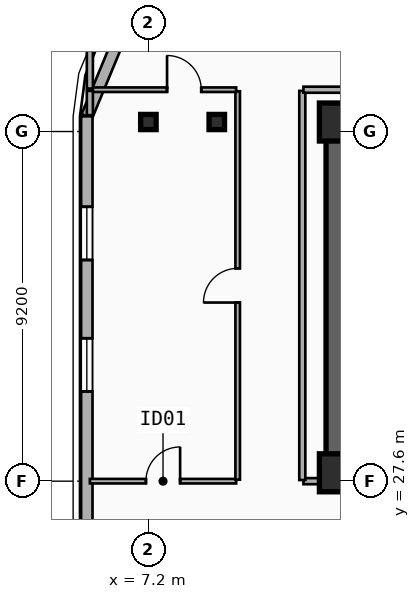
"""IFC4 building model, lengths in metres.
Left out: names, types, materials, properties, quantities, classifications, styles, units other than length and angle.
Written with IfcOpenShell. Run it as: python <this file> out.ifc"""

import sys

from ifc_helpers import new_model, si_unit, direction, frame, frame_2d, origin, origin_2d, place, context, subcontext, project, spatial, rectangle, i_section, extrude, element, fill, save


model = new_model("IFC4")
c1 = context("Model", 3, precision=1e-05, world=origin(), true_north=direction((0.0, 1.0)))
c2 = subcontext(c1, "Body", "Model", "MODEL_VIEW")
j1 = project(units=[si_unit("LENGTHUNIT", "METRE"), si_unit("PLANEANGLEUNIT", "RADIAN")], contexts=[c1])
p1 = place(None, origin())
s1 = spatial("IfcSite", under=j1, at=p1, CompositionType="ELEMENT")
p2 = place(p1, origin())
s2 = spatial("IfcBuilding", under=s1, at=p2, CompositionType="ELEMENT")
p3 = place(p2, frame((0.0, 0.0, 196.8)))
s3 = spatial("IfcBuildingStorey", under=s2, at=p3, CompositionType="ELEMENT", Elevation=196.8)
p4 = place(p3, frame((12.15, 37.05, 0.0), z_axis=(0.0, 0.0, 1.0), x_axis=(1.0, 0.0, 0.0)))
e1 = element("IfcWall", 1, at=p4, inside=s3, PredefinedType="SHEAR", context=c2, shape_type="SweptSolid", body=[
    extrude(rectangle(XDim=33.23, YDim=0.55, at=frame_2d((16.615, 0.0))), origin(), (0.0, 0.0, 1.0), 3.6),
])
p5 = place(p3, frame((21.18, 27.82, 0.0), z_axis=(0.0, 0.0, 1.0), x_axis=(-1.0, 0.0, 0.0)))
e2 = element("IfcWall", 2, at=p5, inside=s3, PredefinedType="SHEAR", context=c2, shape_type="SweptSolid", body=[
    extrude(rectangle(XDim=9.03, YDim=0.55, at=frame_2d((4.515, 0.0))), origin(), (0.0, 0.0, 1.0), 3.6),
])
p6 = place(p5, frame((2.68, 0.0, 0.0)))
e3 = element("IfcOpeningElement", 3, at=p6, cuts=e2, PredefinedType="OPENING", context=c2, shape_type="SweptSolid", body=[
    extrude(rectangle(XDim=1.1, YDim=2.15, at=frame_2d((0.55, 1.075))), frame((0.0, 0.285, 0.0), z_axis=(0.0, -1.0, 0.0), x_axis=(1.0, 0.0, 0.0)), (0.0, 0.0, 1.0), 0.57),
])
p7 = place(p3, frame((12.15, 28.095, 0.0), z_axis=(0.0, 0.0, 1.0), x_axis=(0.0, 1.0, 0.0)))
e4 = element("IfcWall", 4, at=p7, inside=s3, PredefinedType="SHEAR", context=c2, shape_type="SweptSolid", body=[
    extrude(rectangle(XDim=8.68, YDim=0.55, at=frame_2d((4.34, 0.0))), origin(), (0.0, 0.0, 1.0), 3.6),
])
for number, where, z_axis, x_axis in (
    (5, (12.2, 27.82, 0.0), (0.0, 0.0, 1.0), (1.0, 0.0, 0.0)),
    (6, (12.2, 37.05, 0.0), (0.0, 0.0, 1.0), (1.0, 0.0, 0.0)),
):
    element("IfcColumn", number, at=place(p3, frame(where, z_axis=z_axis, x_axis=x_axis)), inside=s3, PredefinedType="COLUMN", context=c2, shape_type="SweptSolid", body=[
        extrude(rectangle(XDim=1.0, YDim=1.0, at=origin_2d()), origin(), (0.0, 0.0, 1.0), 3.6),
    ])
for number, where, z_axis, x_axis in (
    (7, (9.0, 37.05, 0.0), (0.0, 0.0, 1.0), (1.0, 0.0, 0.0)),
    (8, (7.2, 37.05, 0.0), (0.0, 0.0, 1.0), (1.0, 0.0, 0.0)),
):
    element("IfcColumn", number, at=place(p3, frame(where, z_axis=z_axis, x_axis=x_axis)), inside=s3, PredefinedType="COLUMN", context=c2, shape_type="SweptSolid", body=[
        extrude(i_section(OverallWidth=0.408, OverallDepth=0.4, WebThickness=0.025, FlangeThickness=0.039, FilletRadius=0.015, at=origin_2d()), origin(), (0.0, 0.0, 1.0), 3.6),
    ])
p8 = place(p3, frame((5.58, 37.2, 0.0), z_axis=(0.0, 0.0, 1.0), x_axis=(0.382636798336, 0.92389884758, 0.0)))
e9 = element("IfcWall", 9, at=p8, inside=s3, PredefinedType="SOLIDWALL", context=c2, shape_type="SweptSolid", body=[
    extrude(rectangle(XDim=3.077, YDim=0.3, at=frame_2d((1.538, 0.0))), origin(), (0.0, 0.0, 1.0), 3.34),
])
p9 = place(p3, frame((5.58, 8.6, 0.0), z_axis=(0.0, 0.0, 1.0), x_axis=(0.0, 1.0, 0.0)))
e10 = element("IfcWall", 10, at=p9, inside=s3, PredefinedType="SOLIDWALL", context=c2, shape_type="SweptSolid", body=[
    extrude(rectangle(XDim=28.6, YDim=0.3, at=frame_2d((14.3, 0.0))), origin(), (0.0, 0.0, 1.0), 3.34),
])
p10 = place(p9, frame((21.36, 0.0, 0.34)))
e11 = element("IfcOpeningElement", 11, at=p10, cuts=e10, PredefinedType="OPENING", context=c2, shape_type="SweptSolid", body=[
    extrude(rectangle(XDim=1.4, YDim=2.1, at=frame_2d((0.7, 1.05))), frame((0.0, 0.16, 0.0), z_axis=(0.0, -1.0, 0.0), x_axis=(1.0, 0.0, 0.0)), (0.0, 0.0, 1.0), 0.32),
])
p11 = place(p9, frame((24.82, 0.0, 0.34)))
e12 = element("IfcOpeningElement", 12, at=p11, cuts=e10, PredefinedType="OPENING", context=c2, shape_type="SweptSolid", body=[
    extrude(rectangle(XDim=1.4, YDim=2.1, at=frame_2d((0.7, 1.05))), frame((0.0, 0.16, 0.0), z_axis=(0.0, -1.0, 0.0), x_axis=(1.0, 0.0, 0.0)), (0.0, 0.0, 1.0), 0.32),
])
p12 = place(p9, frame((4.797, 0.0, 0.34)))
e13 = element("IfcOpeningElement", 13, at=p12, cuts=e10, PredefinedType="OPENING", context=c2, shape_type="SweptSolid", body=[
    extrude(rectangle(XDim=1.4, YDim=2.1, at=frame_2d((0.7, 1.05))), frame((0.0, 0.16, 0.0), z_axis=(0.0, -1.0, 0.0), x_axis=(1.0, 0.0, 0.0)), (0.0, 0.0, 1.0), 0.32),
])
p13 = place(p9, frame((10.673, 0.0, 0.34)))
e14 = element("IfcOpeningElement", 14, at=p13, cuts=e10, PredefinedType="OPENING", context=c2, shape_type="SweptSolid", body=[
    extrude(rectangle(XDim=1.4, YDim=2.1, at=frame_2d((0.7, 1.05))), frame((0.0, 0.16, 0.0), z_axis=(0.0, -1.0, 0.0), x_axis=(1.0, 0.0, 0.0)), (0.0, 0.0, 1.0), 0.32),
])
p14 = place(p3, frame((5.66, 27.6, 0.0), z_axis=(0.0, 0.0, 1.0), x_axis=(1.0, 0.0, 0.0)))
e15 = element("IfcWall", 15, at=p14, inside=s3, PredefinedType="PARTITIONING", context=c2, shape_type="SweptSolid", body=[
    extrude(rectangle(XDim=3.85, YDim=0.12, at=frame_2d((1.925, 0.0))), origin(), (0.0, 0.0, 1.0), 2.67),
])
p15 = place(p14, frame((1.475, 0.0, 0.0)))
e16 = element("IfcOpeningElement", 16, at=p15, cuts=e15, PredefinedType="OPENING", context=c2, shape_type="SweptSolid", body=[
    extrude(rectangle(XDim=0.9, YDim=2.1, at=frame_2d((0.45, 1.05))), frame((0.0, 0.07, 0.0), z_axis=(0.0, -1.0, 0.0), x_axis=(1.0, 0.0, 0.0)), (0.0, 0.0, 1.0), 0.14),
])
p16 = place(p3, frame((9.55, 27.64, 0.0), z_axis=(0.0, 0.0, 1.0), x_axis=(0.0, 1.0, 0.0)))
e17 = element("IfcWall", 17, at=p16, inside=s3, PredefinedType="PARTITIONING", context=c2, shape_type="SweptSolid", body=[
    extrude(rectangle(XDim=10.22, YDim=0.12, at=frame_2d((5.11, 0.0))), origin(), (0.0, 0.0, 1.0), 2.82),
])
p17 = place(p16, frame((4.66, 0.0, 0.0)))
e18 = element("IfcOpeningElement", 18, at=p17, cuts=e17, PredefinedType="OPENING", context=c2, shape_type="SweptSolid", body=[
    extrude(rectangle(XDim=0.9, YDim=2.1, at=frame_2d((0.45, 1.05))), frame((0.0, 0.07, 0.0), z_axis=(0.0, -1.0, 0.0), x_axis=(1.0, 0.0, 0.0)), (0.0, 0.0, 1.0), 0.14),
])
p18 = place(p3, frame((5.66, 37.9, 0.0), z_axis=(0.0, 0.0, 1.0), x_axis=(1.0, 0.0, 0.0)))
e19 = element("IfcWall", 19, at=p18, inside=s3, PredefinedType="PARTITIONING", context=c2, shape_type="SweptSolid", body=[
    extrude(rectangle(XDim=3.85, YDim=0.12, at=frame_2d((1.925, 0.0))), origin(), (0.0, 0.0, 1.0), 3.34),
])
p19 = place(p18, frame((2.031, 0.0, 0.0)))
e20 = element("IfcOpeningElement", 20, at=p19, cuts=e19, PredefinedType="OPENING", context=c2, shape_type="SweptSolid", body=[
    extrude(rectangle(XDim=0.9, YDim=2.1, at=frame_2d((0.45, 1.05))), frame((0.0, 0.07, 0.0), z_axis=(0.0, -1.0, 0.0), x_axis=(1.0, 0.0, 0.0)), (0.0, 0.0, 1.0), 0.14),
])
p20 = place(p3, frame((11.28, 27.6, 0.0), z_axis=(0.0, 0.0, 1.0), x_axis=(1.0, 0.0, 0.0)))
e21 = element("IfcWall", 21, at=p20, inside=s3, PredefinedType="PARTITIONING", context=c2, shape_type="SweptSolid", body=[
    extrude(rectangle(XDim=0.84, YDim=0.16, at=frame_2d((0.42, 0.0))), origin(), (0.0, 0.0, 1.0), 2.41),
])
p21 = place(p3, frame((11.25, 27.63, 0.0), z_axis=(0.0, 0.0, 1.0), x_axis=(0.0, 1.0, 0.0)))
e22 = element("IfcWall", 22, at=p21, inside=s3, PredefinedType="PARTITIONING", context=c2, shape_type="SweptSolid", body=[
    extrude(rectangle(XDim=10.24, YDim=0.16, at=frame_2d((5.12, 0.0))), origin(), (0.0, 0.0, 1.0), 2.82),
])
p22 = place(p3, frame((11.28, 37.9, 0.0), z_axis=(0.0, 0.0, 1.0), x_axis=(1.0, 0.0, 0.0)))
e23 = element("IfcWall", 23, at=p22, inside=s3, PredefinedType="PARTITIONING", context=c2, shape_type="SweptSolid", body=[
    extrude(rectangle(XDim=35.04, YDim=0.16, at=frame_2d((17.52, 0.0))), origin(), (0.0, 0.0, 1.0), 3.34),
])
p23 = place(p3, frame((5.66, 37.93, 0.0), z_axis=(0.0, 0.0, 1.0), x_axis=(0.0, 1.0, 0.0)))
e24 = element("IfcWall", 24, at=p23, inside=s3, PredefinedType="PARTITIONING", context=c2, shape_type="SweptSolid", body=[
    extrude(rectangle(XDim=1.44, YDim=0.16, at=frame_2d((0.72, 0.0))), origin(), (0.0, 0.0, 1.0), 3.34),
])
p24 = place(p3, frame((5.66, 37.23, 0.0), z_axis=(0.0, 0.0, 1.0), x_axis=(0.0, 1.0, 0.0)))
e25 = element("IfcWall", 25, at=p24, inside=s3, PredefinedType="PARTITIONING", context=c2, shape_type="SweptSolid", body=[
    extrude(rectangle(XDim=0.64, YDim=0.16, at=frame_2d((0.32, 0.0))), origin(), (0.0, 0.0, 1.0), 3.34),
])
p25 = place(p10, origin())
e26 = element("IfcWindow", 26, at=p25, inside=s3, PartitioningType="SINGLE_PANEL", PredefinedType="WINDOW", context=c2, shape_type="SweptSolid", body=[
    extrude(rectangle(XDim=1.4, YDim=2.1, at=frame_2d((0.7, 1.05))), frame((0.0, 0.03, 0.0), z_axis=(0.0, -1.0, 0.0), x_axis=(1.0, 0.0, 0.0)), (0.0, 0.0, 1.0), 0.06),
])
fill(e11, e26)
p26 = place(p11, origin())
e27 = element("IfcWindow", 27, at=p26, inside=s3, PartitioningType="SINGLE_PANEL", PredefinedType="WINDOW", context=c2, shape_type="SweptSolid", body=[
    extrude(rectangle(XDim=1.4, YDim=2.1, at=frame_2d((0.7, 1.05))), frame((0.0, 0.03, 0.0), z_axis=(0.0, -1.0, 0.0), x_axis=(1.0, 0.0, 0.0)), (0.0, 0.0, 1.0), 0.06),
])
fill(e12, e27)
p27 = place(p15, origin())
e28 = element("IfcDoor", 28, at=p27, inside=s3, OperationType="SINGLE_SWING_RIGHT", PredefinedType="DOOR", context=c2, shape_type="SweptSolid", body=[
    extrude(rectangle(XDim=0.9, YDim=2.1, at=frame_2d((0.45, 1.05))), frame((0.0, 0.025, 0.0), z_axis=(0.0, -1.0, 0.0), x_axis=(1.0, 0.0, 0.0)), (0.0, 0.0, 1.0), 0.05),
])
fill(e16, e28)
p28 = place(p17, origin())
e29 = element("IfcDoor", 29, at=p28, inside=s3, OperationType="SINGLE_SWING_LEFT", PredefinedType="DOOR", context=c2, shape_type="SweptSolid", body=[
    extrude(rectangle(XDim=0.9, YDim=2.1, at=frame_2d((0.45, 1.05))), frame((0.0, 0.025, 0.0), z_axis=(0.0, -1.0, 0.0), x_axis=(1.0, 0.0, 0.0)), (0.0, 0.0, 1.0), 0.05),
])
fill(e18, e29)
p29 = place(p19, origin())
e30 = element("IfcDoor", 30, at=p29, inside=s3, OperationType="SINGLE_SWING_LEFT", PredefinedType="DOOR", context=c2, shape_type="SweptSolid", body=[
    extrude(rectangle(XDim=0.9, YDim=2.1, at=frame_2d((0.45, 1.05))), frame((0.0, 0.025, 0.0), z_axis=(0.0, -1.0, 0.0), x_axis=(1.0, 0.0, 0.0)), (0.0, 0.0, 1.0), 0.05),
])
fill(e20, e30)
save(model, sys.argv[1])
